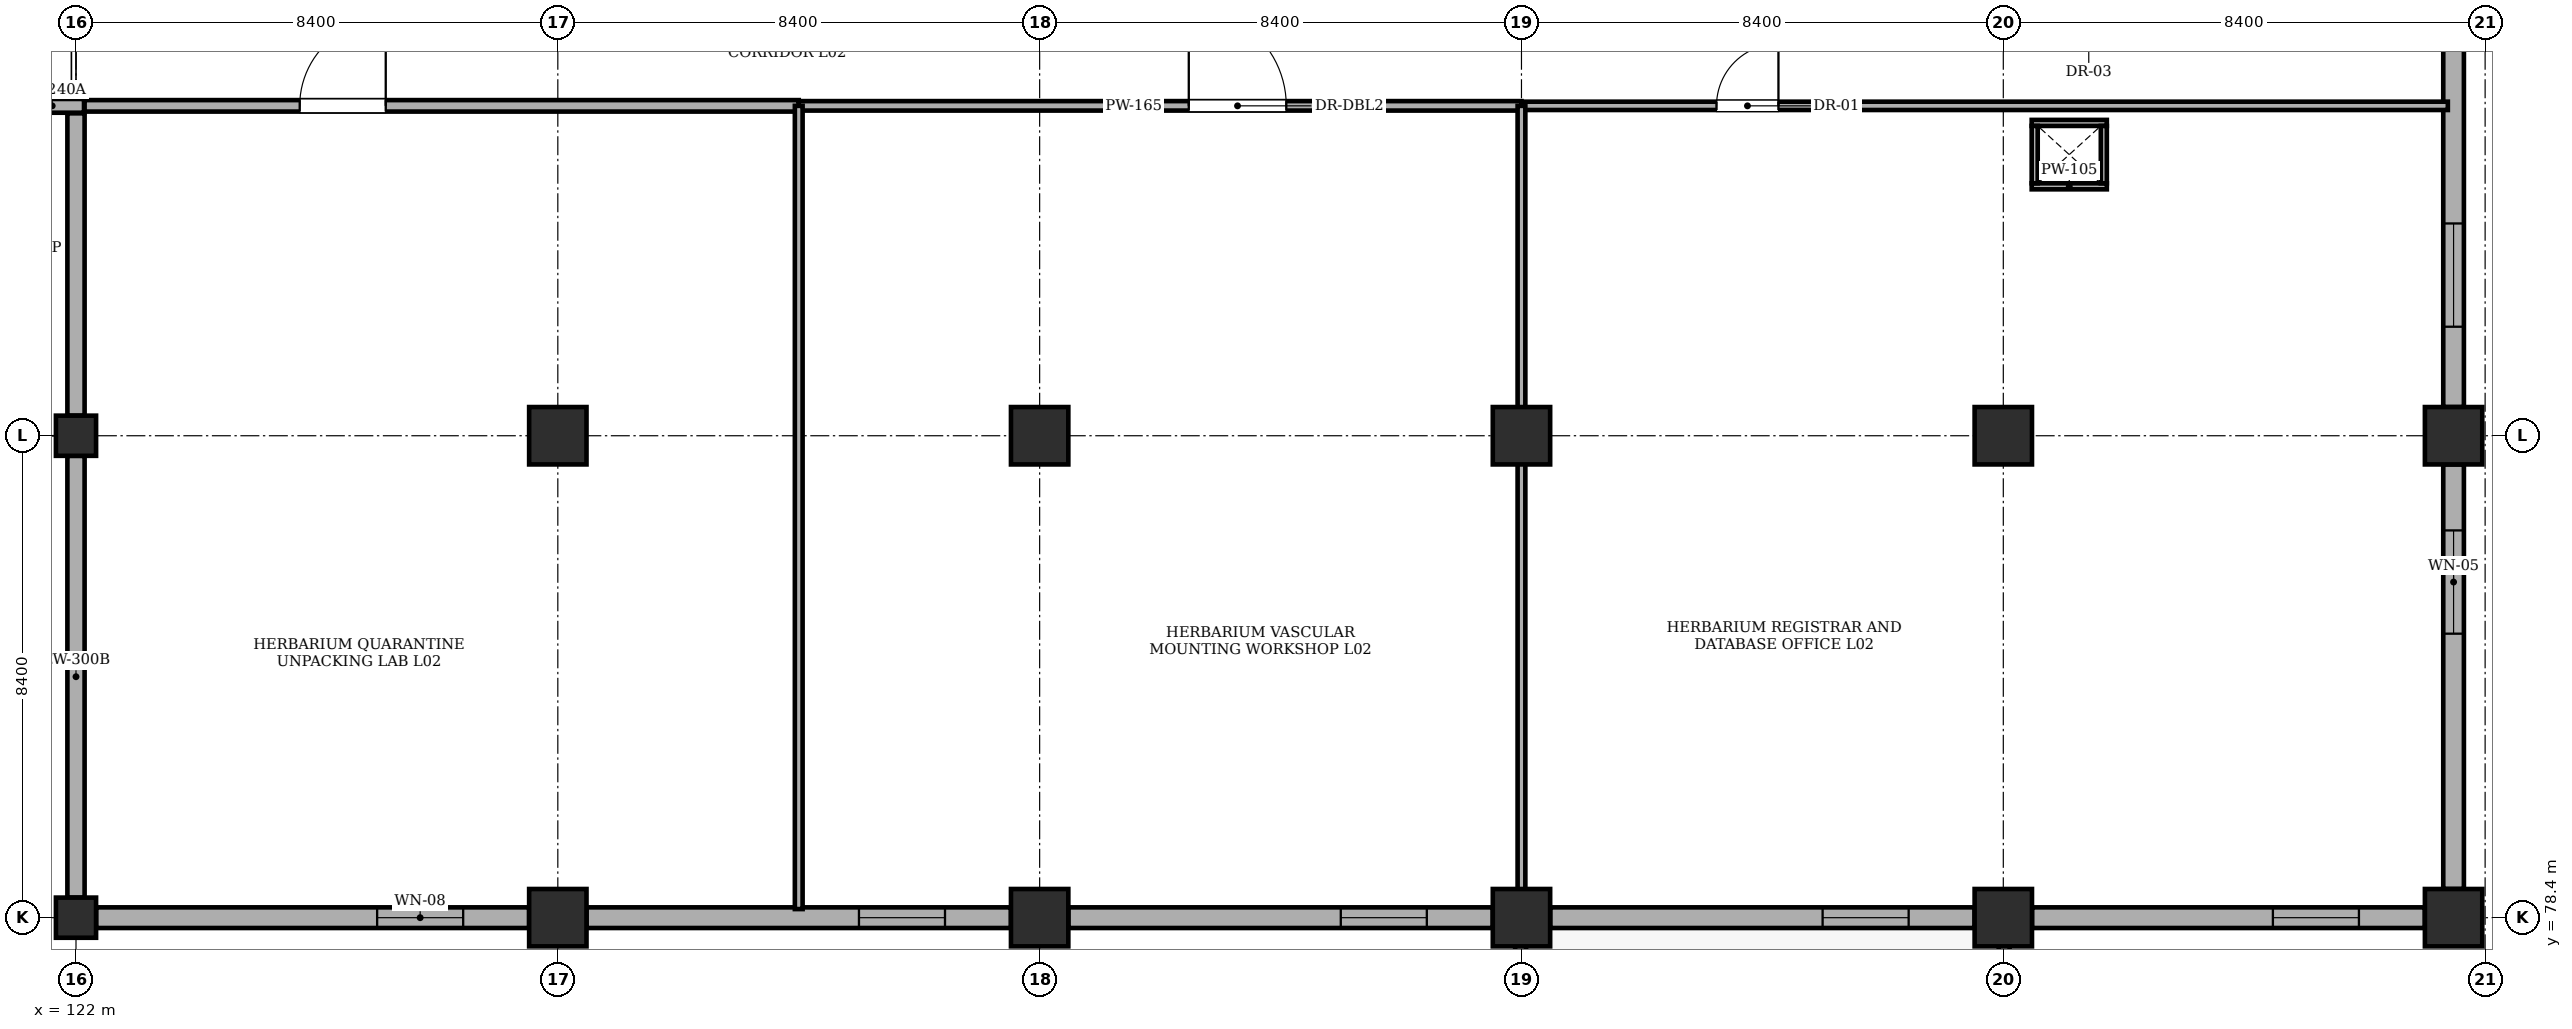
"""IFC4 building model, lengths in metres.
Left out: names, types, materials, properties, quantities, classifications, styles, units other than length and angle.
Written with IfcOpenShell. Run it as: python <this file> out.ifc"""

import sys

from ifc_helpers import new_model, si_unit, direction, frame, frame_2d, origin, origin_2d, place, context, subcontext, project, spatial, rectangle, extrude, element, fill, save


model = new_model("IFC4")
c1 = context("Model", 3, precision=1e-05, world=origin(), true_north=direction((0.0, 1.0)))
c2 = subcontext(c1, "Body", "Model", "MODEL_VIEW")
j1 = project(units=[si_unit("LENGTHUNIT", "METRE"), si_unit("PLANEANGLEUNIT", "RADIAN")], contexts=[c1])
p1 = place(None, origin())
s1 = spatial("IfcSite", under=j1, at=p1, CompositionType="ELEMENT")
p2 = place(p1, origin())
s2 = spatial("IfcBuilding", under=s1, at=p2, CompositionType="ELEMENT")
p3 = place(p2, frame((0.0, 0.0, 5.4)))
s3 = spatial("IfcBuildingStorey", under=s2, at=p3, CompositionType="ELEMENT", Elevation=5.4)
for number, where, z_axis, x_axis in (
    (1, (122.0, 78.4, 0.0), (0.0, 0.0, 1.0), (1.0, 0.0, 0.0)),
    (2, (122.0, 86.8, 0.0), (0.0, 0.0, 1.0), (1.0, 0.0, 0.0)),
):
    element("IfcColumn", number, at=place(p3, frame(where, z_axis=z_axis, x_axis=x_axis)), inside=s3, PredefinedType="COLUMN", context=c2, shape_type="SweptSolid", body=[
        extrude(rectangle(XDim=0.7, YDim=0.7, at=origin_2d()), origin(), (0.0, 0.0, 1.0), 4.58),
    ])
for number, where, z_axis, x_axis in (
    (3, (130.4, 78.4, 0.0), (0.0, 0.0, 1.0), (1.0, 0.0, 0.0)),
    (4, (130.4, 86.8, 0.0), (0.0, 0.0, 1.0), (1.0, 0.0, 0.0)),
    (5, (138.8, 78.4, 0.0), (0.0, 0.0, 1.0), (1.0, 0.0, 0.0)),
    (6, (138.8, 86.8, 0.0), (0.0, 0.0, 1.0), (1.0, 0.0, 0.0)),
    (7, (147.2, 78.4, 0.0), (0.0, 0.0, 1.0), (1.0, 0.0, 0.0)),
    (8, (147.2, 86.8, 0.0), (0.0, 0.0, 1.0), (1.0, 0.0, 0.0)),
    (9, (155.6, 78.4, 0.0), (0.0, 0.0, 1.0), (1.0, 0.0, 0.0)),
    (10, (155.6, 86.8, 0.0), (0.0, 0.0, 1.0), (1.0, 0.0, 0.0)),
    (11, (163.45, 78.4, 0.0), (0.0, 0.0, 1.0), (1.0, 0.0, 0.0)),
    (12, (163.45, 86.8, 0.0), (0.0, 0.0, 1.0), (1.0, 0.0, 0.0)),
):
    element("IfcColumn", number, at=place(p3, frame(where, z_axis=z_axis, x_axis=x_axis)), inside=s3, PredefinedType="COLUMN", context=c2, shape_type="SweptSolid", body=[
        extrude(rectangle(XDim=1.0, YDim=1.0, at=origin_2d()), origin(), (0.0, 0.0, 1.0), 4.58),
    ])
p4 = place(p3, frame((129.9, 78.4, 0.0), z_axis=(0.0, 0.0, 1.0), x_axis=(-1.0, 0.0, 0.0)))
e13 = element("IfcWall", 13, at=p4, inside=s3, PredefinedType="STANDARD", context=c2, shape_type="SweptSolid", body=[
    extrude(rectangle(XDim=7.55, YDim=0.36, at=frame_2d((3.775, 0.0))), origin(), (0.0, 0.0, 1.0), 3.83),
])
p5 = place(p4, frame((1.15, 0.0, 0.95)))
e14 = element("IfcOpeningElement", 14, at=p5, cuts=e13, PredefinedType="OPENING", context=c2, shape_type="SweptSolid", body=[
    extrude(rectangle(XDim=1.5, YDim=1.5, at=frame_2d((0.75, 0.75))), frame((0.0, 0.19, 0.0), z_axis=(0.0, -1.0, 0.0), x_axis=(1.0, 0.0, 0.0)), (0.0, 0.0, 1.0), 0.38),
])
p6 = place(p3, frame((138.3, 78.4, 0.0), z_axis=(0.0, 0.0, 1.0), x_axis=(-1.0, 0.0, 0.0)))
e15 = element("IfcWall", 15, at=p6, inside=s3, PredefinedType="STANDARD", context=c2, shape_type="SweptSolid", body=[
    extrude(rectangle(XDim=7.4, YDim=0.36, at=frame_2d((3.7, 0.0))), origin(), (0.0, 0.0, 1.0), 3.83),
])
p7 = place(p6, frame((1.15, 0.0, 0.95)))
e16 = element("IfcOpeningElement", 16, at=p7, cuts=e15, PredefinedType="OPENING", context=c2, shape_type="SweptSolid", body=[
    extrude(rectangle(XDim=1.5, YDim=1.5, at=frame_2d((0.75, 0.75))), frame((0.0, 0.19, 0.0), z_axis=(0.0, -1.0, 0.0), x_axis=(1.0, 0.0, 0.0)), (0.0, 0.0, 1.0), 0.38),
])
p8 = place(p3, frame((146.7, 78.4, 0.0), z_axis=(0.0, 0.0, 1.0), x_axis=(-1.0, 0.0, 0.0)))
e17 = element("IfcWall", 17, at=p8, inside=s3, PredefinedType="STANDARD", context=c2, shape_type="SweptSolid", body=[
    extrude(rectangle(XDim=7.4, YDim=0.36, at=frame_2d((3.7, 0.0))), origin(), (0.0, 0.0, 1.0), 3.83),
])
p9 = place(p8, frame((1.15, 0.0, 0.95)))
e18 = element("IfcOpeningElement", 18, at=p9, cuts=e17, PredefinedType="OPENING", context=c2, shape_type="SweptSolid", body=[
    extrude(rectangle(XDim=1.5, YDim=1.5, at=frame_2d((0.75, 0.75))), frame((0.0, 0.19, 0.0), z_axis=(0.0, -1.0, 0.0), x_axis=(1.0, 0.0, 0.0)), (0.0, 0.0, 1.0), 0.38),
])
p10 = place(p3, frame((155.1, 78.4, 0.0), z_axis=(0.0, 0.0, 1.0), x_axis=(-1.0, 0.0, 0.0)))
e19 = element("IfcWall", 19, at=p10, inside=s3, PredefinedType="STANDARD", context=c2, shape_type="SweptSolid", body=[
    extrude(rectangle(XDim=7.4, YDim=0.36, at=frame_2d((3.7, 0.0))), origin(), (0.0, 0.0, 1.0), 3.83),
])
p11 = place(p10, frame((1.15, 0.0, 0.95)))
e20 = element("IfcOpeningElement", 20, at=p11, cuts=e19, PredefinedType="OPENING", context=c2, shape_type="SweptSolid", body=[
    extrude(rectangle(XDim=1.5, YDim=1.5, at=frame_2d((0.75, 0.75))), frame((0.0, 0.19, 0.0), z_axis=(0.0, -1.0, 0.0), x_axis=(1.0, 0.0, 0.0)), (0.0, 0.0, 1.0), 0.38),
])
p12 = place(p3, frame((162.95, 78.4, 0.0), z_axis=(0.0, 0.0, 1.0), x_axis=(-1.0, 0.0, 0.0)))
e21 = element("IfcWall", 21, at=p12, inside=s3, PredefinedType="STANDARD", context=c2, shape_type="SweptSolid", body=[
    extrude(rectangle(XDim=6.85, YDim=0.36, at=frame_2d((3.425, 0.0))), origin(), (0.0, 0.0, 1.0), 3.83),
])
p13 = place(p12, frame((1.15, 0.0, 0.95)))
e22 = element("IfcOpeningElement", 22, at=p13, cuts=e21, PredefinedType="OPENING", context=c2, shape_type="SweptSolid", body=[
    extrude(rectangle(XDim=1.5, YDim=1.5, at=frame_2d((0.75, 0.75))), frame((0.0, 0.19, 0.0), z_axis=(0.0, -1.0, 0.0), x_axis=(1.0, 0.0, 0.0)), (0.0, 0.0, 1.0), 0.38),
])
p14 = place(p3, frame((163.45, 86.3, 0.0), z_axis=(0.0, 0.0, 1.0), x_axis=(0.0, -1.0, 0.0)))
e23 = element("IfcWall", 23, at=p14, inside=s3, PredefinedType="STANDARD", context=c2, shape_type="SweptSolid", body=[
    extrude(rectangle(XDim=7.4, YDim=0.36, at=frame_2d((3.7, 0.0))), origin(), (0.0, 0.0, 1.0), 3.83),
])
p15 = place(p14, frame((1.15, 0.0, 1.1)))
e24 = element("IfcOpeningElement", 24, at=p15, cuts=e23, PredefinedType="OPENING", context=c2, shape_type="SweptSolid", body=[
    extrude(rectangle(XDim=1.8, YDim=1.8, at=frame_2d((0.9, 0.9))), frame((0.0, 0.19, 0.0), z_axis=(0.0, -1.0, 0.0), x_axis=(1.0, 0.0, 0.0)), (0.0, 0.0, 1.0), 0.38),
])
p16 = place(p3, frame((163.45, 94.7, 0.0), z_axis=(0.0, 0.0, 1.0), x_axis=(0.0, -1.0, 0.0)))
e25 = element("IfcWall", 25, at=p16, inside=s3, PredefinedType="STANDARD", context=c2, shape_type="SweptSolid", body=[
    extrude(rectangle(XDim=7.4, YDim=0.36, at=frame_2d((3.7, 0.0))), origin(), (0.0, 0.0, 1.0), 3.83),
])
p17 = place(p16, frame((4.2, 0.0, 1.1)))
e26 = element("IfcOpeningElement", 26, at=p17, cuts=e25, PredefinedType="OPENING", context=c2, shape_type="SweptSolid", body=[
    extrude(rectangle(XDim=1.8, YDim=1.8, at=frame_2d((0.9, 0.9))), frame((0.0, 0.19, 0.0), z_axis=(0.0, -1.0, 0.0), x_axis=(1.0, 0.0, 0.0)), (0.0, 0.0, 1.0), 0.38),
])
p18 = place(p3, frame((122.0, 78.75, 0.0), z_axis=(0.0, 0.0, 1.0), x_axis=(0.0, 1.0, 0.0)))
e27 = element("IfcWall", 27, at=p18, inside=s3, PredefinedType="STANDARD", context=c2, shape_type="SweptSolid", body=[
    extrude(rectangle(XDim=7.7, YDim=0.3, at=frame_2d((3.85, 0.0))), origin(), (0.0, 0.0, 1.0), 3.83),
])
p19 = place(p3, frame((122.0, 87.15, 0.0), z_axis=(0.0, 0.0, 1.0), x_axis=(0.0, 1.0, 0.0)))
e28 = element("IfcWall", 28, at=p19, inside=s3, PredefinedType="STANDARD", context=c2, shape_type="SweptSolid", body=[
    extrude(rectangle(XDim=5.27, YDim=0.3, at=frame_2d((2.635, 0.0))), origin(), (0.0, 0.0, 1.0), 3.83),
])
p20 = place(p3, frame((122.14, 92.55, 0.0), z_axis=(0.0, 0.0, 1.0), x_axis=(-1.0, 0.0, 0.0)))
e29 = element("IfcWall", 29, at=p20, inside=s3, PredefinedType="STANDARD", context=c2, shape_type="SweptSolid", body=[
    extrude(rectangle(XDim=1.11, YDim=0.24, at=frame_2d((0.555, 0.0))), origin(), (0.0, 0.0, 1.0), 4.58),
])
for number, where, z_axis, x_axis in (
    (30, (147.185, 49.68, 0.0), (0.0, 0.0, 1.0), (0.0, 1.0, 0.0)),
    (31, (155.615, 78.22, 0.0), (0.0, 0.0, 1.0), (0.0, -1.0, 0.0)),
):
    element("IfcWall", number, at=place(p3, frame(where, z_axis=z_axis, x_axis=x_axis)), inside=s3, PredefinedType="PARAPET", context=c2, shape_type="SweptSolid", body=[
        extrude(rectangle(XDim=28.54, YDim=0.19, at=frame_2d((14.27, 0.0))), origin(), (0.0, 0.0, 1.0), 1.2),
    ])
p21 = place(p3, frame((122.15, 92.55, 0.0), z_axis=(0.0, 0.0, 1.0), x_axis=(1.0, 0.0, 0.0)))
e32 = element("IfcWall", 32, at=p21, inside=s3, PredefinedType="SOLIDWALL", context=c2, shape_type="SweptSolid", body=[
    extrude(rectangle(XDim=12.45, YDim=0.2, at=frame_2d((6.225, 0.0))), origin(), (0.0, 0.0, 1.0), 4.58),
])
p22 = place(p21, frame((3.75, 0.0, 0.0)))
e33 = element("IfcOpeningElement", 33, at=p22, cuts=e32, PredefinedType="OPENING", context=c2, shape_type="SweptSolid", body=[
    extrude(rectangle(XDim=1.5, YDim=2.2, at=frame_2d((0.75, 1.1))), frame((0.0, 0.11, 0.0), z_axis=(0.0, -1.0, 0.0), x_axis=(1.0, 0.0, 0.0)), (0.0, 0.0, 1.0), 0.22),
])
p23 = place(p3, frame((134.6, 92.55, 0.0), z_axis=(0.0, 0.0, 1.0), x_axis=(1.0, 0.0, 0.0)))
e34 = element("IfcWall", 34, at=p23, inside=s3, PredefinedType="PARTITIONING", context=c2, shape_type="SweptSolid", body=[
    extrude(rectangle(XDim=12.6, YDim=0.165, at=frame_2d((6.3, 0.0))), origin(), (0.0, 0.0, 1.0), 4.58),
])
p24 = place(p23, frame((6.8, 0.0, 0.0)))
e35 = element("IfcOpeningElement", 35, at=p24, cuts=e34, PredefinedType="OPENING", context=c2, shape_type="SweptSolid", body=[
    extrude(rectangle(XDim=1.7, YDim=2.2, at=frame_2d((0.85, 1.1))), frame((0.0, 0.093, 0.0), z_axis=(0.0, -1.0, 0.0), x_axis=(1.0, 0.0, 0.0)), (0.0, 0.0, 1.0), 0.185),
])
p25 = place(p3, frame((134.6, 78.55, 0.0), z_axis=(0.0, 0.0, 1.0), x_axis=(0.0, 1.0, 0.0)))
e36 = element("IfcWall", 36, at=p25, inside=s3, PredefinedType="PARTITIONING", context=c2, shape_type="SweptSolid", body=[
    extrude(rectangle(XDim=14.0, YDim=0.135, at=frame_2d((7.0, 0.0))), origin(), (0.0, 0.0, 1.0), 4.03),
])
p26 = place(p3, frame((147.2, 92.55, 0.0), z_axis=(0.0, 0.0, 1.0), x_axis=(1.0, 0.0, 0.0)))
e37 = element("IfcWall", 37, at=p26, inside=s3, PredefinedType="PARTITIONING", context=c2, shape_type="SweptSolid", body=[
    extrude(rectangle(XDim=16.15, YDim=0.145, at=frame_2d((8.075, 0.0))), origin(), (0.0, 0.0, 1.0), 4.58),
])
p27 = place(p26, frame((3.4, 0.0, 0.0)))
e38 = element("IfcOpeningElement", 38, at=p27, cuts=e37, PredefinedType="OPENING", context=c2, shape_type="SweptSolid", body=[
    extrude(rectangle(XDim=1.08, YDim=2.15, at=frame_2d((0.54, 1.075))), frame((0.0, 0.083, 0.0), z_axis=(0.0, -1.0, 0.0), x_axis=(1.0, 0.0, 0.0)), (0.0, 0.0, 1.0), 0.165),
])
p28 = place(p3, frame((147.2, 78.55, 0.0), z_axis=(0.0, 0.0, 1.0), x_axis=(0.0, 1.0, 0.0)))
e39 = element("IfcWall", 39, at=p28, inside=s3, PredefinedType="PARTITIONING", context=c2, shape_type="SweptSolid", body=[
    extrude(rectangle(XDim=14.0, YDim=0.135, at=frame_2d((7.0, 0.0))), origin(), (0.0, 0.0, 1.0), 3.83),
])
for number, where, z_axis, x_axis in (
    (40, (156.095, 91.147, 0.0), (0.0, 0.0, 1.0), (1.0, 0.0, 0.0)),
    (41, (156.095, 92.252, 0.0), (0.0, 0.0, 1.0), (1.0, 0.0, 0.0)),
):
    element("IfcWall", number, at=place(p3, frame(where, z_axis=z_axis, x_axis=x_axis)), inside=s3, PredefinedType="PARTITIONING", context=c2, shape_type="SweptSolid", body=[
        extrude(rectangle(XDim=1.31, YDim=0.105, at=frame_2d((0.655, 0.0))), origin(), (0.0, 0.0, 1.0), 4.58),
    ])
for number, where, z_axis, x_axis in (
    (42, (156.147, 91.2, 0.0), (0.0, 0.0, 1.0), (0.0, 1.0, 0.0)),
    (43, (157.353, 91.2, 0.0), (0.0, 0.0, 1.0), (0.0, 1.0, 0.0)),
):
    element("IfcWall", number, at=place(p3, frame(where, z_axis=z_axis, x_axis=x_axis)), inside=s3, PredefinedType="PARTITIONING", context=c2, shape_type="SweptSolid", body=[
        extrude(rectangle(XDim=1.0, YDim=0.105, at=frame_2d((0.5, 0.0))), origin(), (0.0, 0.0, 1.0), 4.58),
    ])
p29 = place(p5, origin())
e44 = element("IfcWindow", 44, at=p29, inside=s3, PartitioningType="DOUBLE_PANEL_VERTICAL", PredefinedType="WINDOW", context=c2, shape_type="SweptSolid", body=[
    extrude(rectangle(XDim=1.5, YDim=1.5, at=frame_2d((0.75, 0.75))), frame((0.0, 0.03, 0.0), z_axis=(0.0, -1.0, 0.0), x_axis=(1.0, 0.0, 0.0)), (0.0, 0.0, 1.0), 0.06),
])
fill(e14, e44)
p30 = place(p7, origin())
e45 = element("IfcWindow", 45, at=p30, inside=s3, PartitioningType="DOUBLE_PANEL_VERTICAL", PredefinedType="WINDOW", context=c2, shape_type="SweptSolid", body=[
    extrude(rectangle(XDim=1.5, YDim=1.5, at=frame_2d((0.75, 0.75))), frame((0.0, 0.03, 0.0), z_axis=(0.0, -1.0, 0.0), x_axis=(1.0, 0.0, 0.0)), (0.0, 0.0, 1.0), 0.06),
])
fill(e16, e45)
p31 = place(p9, origin())
e46 = element("IfcWindow", 46, at=p31, inside=s3, PartitioningType="DOUBLE_PANEL_VERTICAL", PredefinedType="WINDOW", context=c2, shape_type="SweptSolid", body=[
    extrude(rectangle(XDim=1.5, YDim=1.5, at=frame_2d((0.75, 0.75))), frame((0.0, 0.03, 0.0), z_axis=(0.0, -1.0, 0.0), x_axis=(1.0, 0.0, 0.0)), (0.0, 0.0, 1.0), 0.06),
])
fill(e18, e46)
p32 = place(p11, origin())
e47 = element("IfcWindow", 47, at=p32, inside=s3, PartitioningType="DOUBLE_PANEL_VERTICAL", PredefinedType="WINDOW", context=c2, shape_type="SweptSolid", body=[
    extrude(rectangle(XDim=1.5, YDim=1.5, at=frame_2d((0.75, 0.75))), frame((0.0, 0.03, 0.0), z_axis=(0.0, -1.0, 0.0), x_axis=(1.0, 0.0, 0.0)), (0.0, 0.0, 1.0), 0.06),
])
fill(e20, e47)
p33 = place(p13, origin())
e48 = element("IfcWindow", 48, at=p33, inside=s3, PartitioningType="DOUBLE_PANEL_VERTICAL", PredefinedType="WINDOW", context=c2, shape_type="SweptSolid", body=[
    extrude(rectangle(XDim=1.5, YDim=1.5, at=frame_2d((0.75, 0.75))), frame((0.0, 0.03, 0.0), z_axis=(0.0, -1.0, 0.0), x_axis=(1.0, 0.0, 0.0)), (0.0, 0.0, 1.0), 0.06),
])
fill(e22, e48)
p34 = place(p15, origin())
e49 = element("IfcWindow", 49, at=p34, inside=s3, PartitioningType="DOUBLE_PANEL_VERTICAL", PredefinedType="WINDOW", context=c2, shape_type="SweptSolid", body=[
    extrude(rectangle(XDim=1.8, YDim=1.8, at=frame_2d((0.9, 0.9))), frame((0.0, 0.03, 0.0), z_axis=(0.0, -1.0, 0.0), x_axis=(1.0, 0.0, 0.0)), (0.0, 0.0, 1.0), 0.06),
])
fill(e24, e49)
p35 = place(p17, origin())
e50 = element("IfcWindow", 50, at=p35, inside=s3, PartitioningType="DOUBLE_PANEL_VERTICAL", PredefinedType="WINDOW", context=c2, shape_type="SweptSolid", body=[
    extrude(rectangle(XDim=1.8, YDim=1.8, at=frame_2d((0.9, 0.9))), frame((0.0, 0.03, 0.0), z_axis=(0.0, -1.0, 0.0), x_axis=(1.0, 0.0, 0.0)), (0.0, 0.0, 1.0), 0.06),
])
fill(e26, e50)
p36 = place(p22, origin())
e51 = element("IfcDoor", 51, at=p36, inside=s3, OperationType="SINGLE_SWING_RIGHT", PredefinedType="DOOR", context=c2, shape_type="SweptSolid", body=[
    extrude(rectangle(XDim=1.5, YDim=2.2, at=frame_2d((0.75, 1.1))), frame((0.0, 0.025, 0.0), z_axis=(0.0, -1.0, 0.0), x_axis=(1.0, 0.0, 0.0)), (0.0, 0.0, 1.0), 0.05),
])
fill(e33, e51)
p37 = place(p24, origin())
e52 = element("IfcDoor", 52, at=p37, inside=s3, OperationType="SINGLE_SWING_LEFT", PredefinedType="DOOR", context=c2, shape_type="SweptSolid", body=[
    extrude(rectangle(XDim=1.7, YDim=2.2, at=frame_2d((0.85, 1.1))), frame((0.0, 0.025, 0.0), z_axis=(0.0, -1.0, 0.0), x_axis=(1.0, 0.0, 0.0)), (0.0, 0.0, 1.0), 0.05),
])
fill(e35, e52)
p38 = place(p27, origin())
e53 = element("IfcDoor", 53, at=p38, inside=s3, OperationType="SINGLE_SWING_RIGHT", PredefinedType="DOOR", context=c2, shape_type="SweptSolid", body=[
    extrude(rectangle(XDim=1.08, YDim=2.15, at=frame_2d((0.54, 1.075))), frame((0.0, 0.025, 0.0), z_axis=(0.0, -1.0, 0.0), x_axis=(1.0, 0.0, 0.0)), (0.0, 0.0, 1.0), 0.05),
])
fill(e38, e53)
save(model, sys.argv[1])
